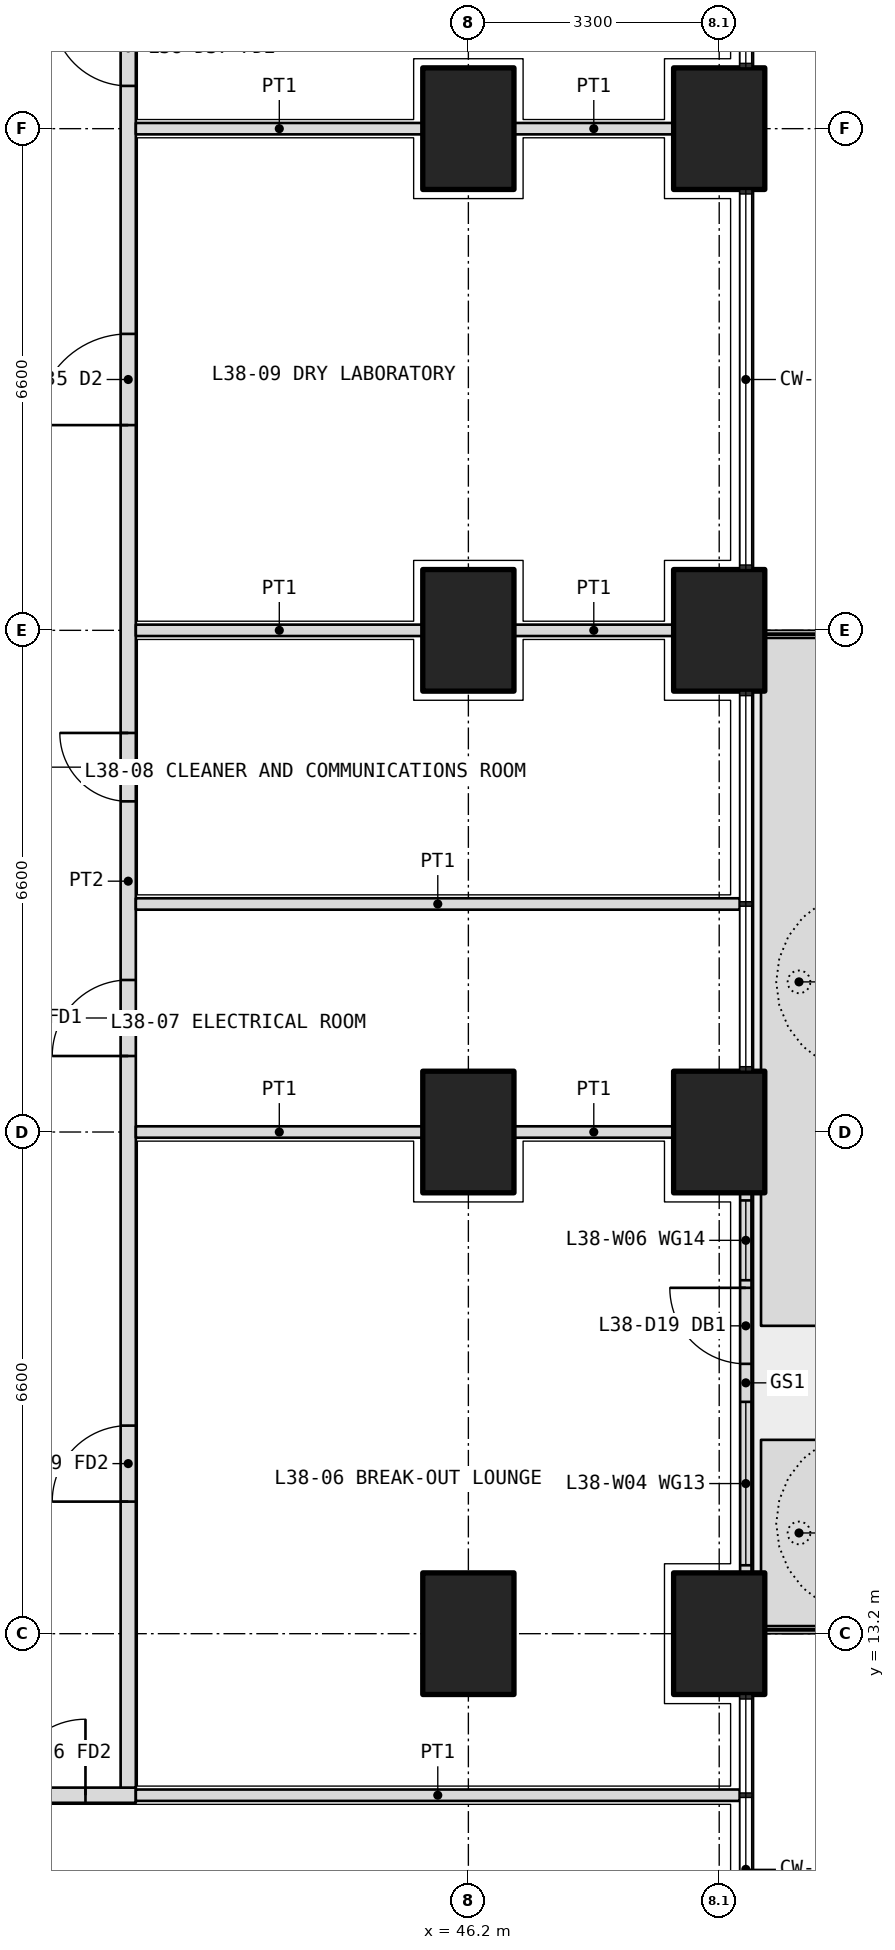
"""IFC4 building model, lengths in metres.
Left out: names, types, materials, properties, quantities, classifications, styles, units other than length and angle.
Written with IfcOpenShell. Run it as: python <this file> out.ifc"""

import sys

from ifc_helpers import new_model, si_unit, direction, frame, frame_2d, origin, origin_2d, place, context, subcontext, project, spatial, polyline, rectangle, outline, extrude, element, fill, save


model = new_model("IFC4")
c1 = context("Model", 3, precision=1e-05, world=origin(), true_north=direction((0.0, 1.0)))
c2 = subcontext(c1, "Body", "Model", "MODEL_VIEW")
j1 = project(units=[si_unit("LENGTHUNIT", "METRE"), si_unit("PLANEANGLEUNIT", "RADIAN")], contexts=[c1])
p1 = place(None, origin())
s1 = spatial("IfcSite", under=j1, at=p1, CompositionType="ELEMENT")
p2 = place(p1, origin())
s2 = spatial("IfcBuilding", under=s1, at=p2, CompositionType="ELEMENT")
p3 = place(p2, frame((0.0, 0.0, 168.3)))
s3 = spatial("IfcBuildingStorey", under=s2, at=p3, CompositionType="ELEMENT", Elevation=168.3)
for number, where, z_axis, x_axis in (
    (1, (49.5, 13.2, 0.0), (0.0, 0.0, 1.0), (0.0, 1.0, 0.0)),
    (2, (49.5, 19.8, 0.0), (0.0, 0.0, 1.0), (0.0, 1.0, 0.0)),
    (3, (49.5, 26.4, 0.0), (0.0, 0.0, 1.0), (0.0, 1.0, 0.0)),
    (4, (49.5, 33.0, 0.0), (0.0, 0.0, 1.0), (0.0, 1.0, 0.0)),
    (5, (46.2, 13.2, 0.0), (0.0, 0.0, 1.0), (0.0, 1.0, 0.0)),
    (6, (46.2, 19.8, 0.0), (0.0, 0.0, 1.0), (0.0, 1.0, 0.0)),
    (7, (46.2, 26.4, 0.0), (0.0, 0.0, 1.0), (0.0, 1.0, 0.0)),
    (8, (46.2, 33.0, 0.0), (0.0, 0.0, 1.0), (0.0, 1.0, 0.0)),
):
    element("IfcColumn", number, at=place(p3, frame(where, z_axis=z_axis, x_axis=x_axis)), inside=s3, PredefinedType="COLUMN", context=c2, shape_type="SweptSolid", body=[
        extrude(rectangle(XDim=1.6, YDim=1.2, at=origin_2d()), origin(), (0.0, 0.0, 1.0), 4.2),
    ])
p4 = place(p3, origin())
e9 = element("IfcWall", 9, at=p4, inside=s3, PredefinedType="USERDEFINED", context=c2, shape_type="SweptSolid", body=[
    extrude(outline(polyline([(50.05, 13.3), (51.05, 13.3), (51.05, 15.75), (50.05, 15.75), (50.05, 13.3)]), holes=[polyline([(50.2, 13.45), (50.9, 13.45), (50.9, 15.6), (50.2, 15.6), (50.2, 13.45)])]), origin(), (0.0, 0.0, 1.0), 1.05),
])
p5 = place(p3, origin())
e10 = element("IfcWall", 10, at=p5, inside=s3, PredefinedType="USERDEFINED", context=c2, shape_type="SweptSolid", body=[
    extrude(outline(polyline([(50.05, 17.25), (51.05, 17.25), (51.05, 26.3), (50.05, 26.3), (50.05, 17.25)]), holes=[polyline([(50.2, 17.4), (50.9, 17.4), (50.9, 26.15), (50.2, 26.15), (50.2, 17.4)])]), origin(), (0.0, 0.0, 1.0), 1.05),
])
p6 = place(p3, frame((49.85, 14.0, 0.0), z_axis=(0.0, 0.0, 1.0), x_axis=(0.0, 1.0, 0.0)))
e11 = element("IfcWall", 11, at=p6, inside=s3, PredefinedType="SOLIDWALL", context=c2, shape_type="SweptSolid", body=[
    extrude(rectangle(XDim=5.0, YDim=0.15, at=frame_2d((2.5, 0.0))), origin(), (0.0, 0.0, 1.0), 2.7),
])
p7 = place(p6, frame((2.75, 0.0, 0.0)))
e12 = element("IfcOpeningElement", 12, at=p7, cuts=e11, PredefinedType="OPENING", context=c2, shape_type="SweptSolid", body=[
    extrude(rectangle(XDim=1.0, YDim=2.4, at=frame_2d((0.5, 1.2))), frame((0.0, 0.085, 0.0), z_axis=(0.0, -1.0, 0.0), x_axis=(1.0, 0.0, 0.0)), (0.0, 0.0, 1.0), 0.17),
])
p8 = place(p6, frame((0.1, 0.0, 0.1)))
e13 = element("IfcOpeningElement", 13, at=p8, cuts=e11, PredefinedType="OPENING", context=c2, shape_type="SweptSolid", body=[
    extrude(rectangle(XDim=2.15, YDim=2.3, at=frame_2d((1.075, 1.15))), frame((0.0, 0.085, 0.0), z_axis=(0.0, -1.0, 0.0), x_axis=(1.0, 0.0, 0.0)), (0.0, 0.0, 1.0), 0.17),
])
p9 = place(p6, frame((3.85, 0.0, 0.1)))
e14 = element("IfcOpeningElement", 14, at=p9, cuts=e11, PredefinedType="OPENING", context=c2, shape_type="SweptSolid", body=[
    extrude(rectangle(XDim=1.05, YDim=2.3, at=frame_2d((0.525, 1.15))), frame((0.0, 0.085, 0.0), z_axis=(0.0, -1.0, 0.0), x_axis=(1.0, 0.0, 0.0)), (0.0, 0.0, 1.0), 0.17),
])
p10 = place(p3, frame((10.975, 11.075, 0.0), z_axis=(0.0, 0.0, 1.0), x_axis=(1.0, 0.0, 0.0)))
e15 = element("IfcWall", 15, at=p10, inside=s3, PredefinedType="PARTITIONING", context=c2, shape_type="SweptSolid", body=[
    extrude(rectangle(XDim=30.85, YDim=0.2, at=frame_2d((15.425, 0.0))), origin(), (0.0, 0.0, 1.0), 2.85),
])
p11 = place(p10, frame((7.262, 0.0, 0.0)))
e16 = element("IfcOpeningElement", 16, at=p11, cuts=e15, PredefinedType="OPENING", context=c2, shape_type="SweptSolid", body=[
    extrude(rectangle(XDim=1.0, YDim=2.1, at=frame_2d((0.5, 1.05))), frame((0.0, 0.11, 0.0), z_axis=(0.0, -1.0, 0.0), x_axis=(1.0, 0.0, 0.0)), (0.0, 0.0, 1.0), 0.22),
])
p12 = place(p10, frame((16.475, 0.0, 0.0)))
e17 = element("IfcOpeningElement", 17, at=p12, cuts=e15, PredefinedType="OPENING", context=c2, shape_type="SweptSolid", body=[
    extrude(rectangle(XDim=1.2, YDim=2.1, at=frame_2d((0.6, 1.05))), frame((0.0, 0.11, 0.0), z_axis=(0.0, -1.0, 0.0), x_axis=(1.0, 0.0, 0.0)), (0.0, 0.0, 1.0), 0.22),
])
p13 = place(p10, frame((21.525, 0.0, 0.0)))
e18 = element("IfcOpeningElement", 18, at=p13, cuts=e15, PredefinedType="OPENING", context=c2, shape_type="SweptSolid", body=[
    extrude(rectangle(XDim=1.0, YDim=2.1, at=frame_2d((0.5, 1.05))), frame((0.0, 0.11, 0.0), z_axis=(0.0, -1.0, 0.0), x_axis=(1.0, 0.0, 0.0)), (0.0, 0.0, 1.0), 0.22),
])
p14 = place(p10, frame((26.375, 0.0, 0.0)))
e19 = element("IfcOpeningElement", 19, at=p14, cuts=e15, PredefinedType="OPENING", context=c2, shape_type="SweptSolid", body=[
    extrude(rectangle(XDim=1.2, YDim=2.1, at=frame_2d((0.6, 1.05))), frame((0.0, 0.11, 0.0), z_axis=(0.0, -1.0, 0.0), x_axis=(1.0, 0.0, 0.0)), (0.0, 0.0, 1.0), 0.22),
])
p15 = place(p10, frame((29.188, 0.0, 0.0)))
e20 = element("IfcOpeningElement", 20, at=p15, cuts=e15, PredefinedType="OPENING", context=c2, shape_type="SweptSolid", body=[
    extrude(rectangle(XDim=1.0, YDim=2.1, at=frame_2d((0.5, 1.05))), frame((0.0, 0.11, 0.0), z_axis=(0.0, -1.0, 0.0), x_axis=(1.0, 0.0, 0.0)), (0.0, 0.0, 1.0), 0.22),
])
p16 = place(p3, frame((41.725, 11.175, 0.0), z_axis=(0.0, 0.0, 1.0), x_axis=(0.0, 1.0, 0.0)))
e21 = element("IfcWall", 21, at=p16, inside=s3, PredefinedType="PARTITIONING", context=c2, shape_type="SweptSolid", body=[
    extrude(rectangle(XDim=23.85, YDim=0.2, at=frame_2d((11.925, 0.0))), origin(), (0.0, 0.0, 1.0), 2.85),
])
p17 = place(p16, frame((3.762, 0.0, 0.0)))
e22 = element("IfcOpeningElement", 22, at=p17, cuts=e21, PredefinedType="OPENING", context=c2, shape_type="SweptSolid", body=[
    extrude(rectangle(XDim=1.0, YDim=2.1, at=frame_2d((0.5, 1.05))), frame((0.0, 0.11, 0.0), z_axis=(0.0, -1.0, 0.0), x_axis=(1.0, 0.0, 0.0)), (0.0, 0.0, 1.0), 0.22),
])
p18 = place(p16, frame((9.625, 0.0, 0.0)))
e23 = element("IfcOpeningElement", 23, at=p18, cuts=e21, PredefinedType="OPENING", context=c2, shape_type="SweptSolid", body=[
    extrude(rectangle(XDim=1.0, YDim=2.1, at=frame_2d((0.5, 1.05))), frame((0.0, 0.11, 0.0), z_axis=(0.0, -1.0, 0.0), x_axis=(1.0, 0.0, 0.0)), (0.0, 0.0, 1.0), 0.22),
])
p19 = place(p16, frame((12.975, 0.0, 0.0)))
e24 = element("IfcOpeningElement", 24, at=p19, cuts=e21, PredefinedType="OPENING", context=c2, shape_type="SweptSolid", body=[
    extrude(rectangle(XDim=0.9, YDim=2.1, at=frame_2d((0.45, 1.05))), frame((0.0, 0.11, 0.0), z_axis=(0.0, -1.0, 0.0), x_axis=(1.0, 0.0, 0.0)), (0.0, 0.0, 1.0), 0.22),
])
p20 = place(p16, frame((17.925, 0.0, 0.0)))
e25 = element("IfcOpeningElement", 25, at=p20, cuts=e21, PredefinedType="OPENING", context=c2, shape_type="SweptSolid", body=[
    extrude(rectangle(XDim=1.2, YDim=2.1, at=frame_2d((0.6, 1.05))), frame((0.0, 0.11, 0.0), z_axis=(0.0, -1.0, 0.0), x_axis=(1.0, 0.0, 0.0)), (0.0, 0.0, 1.0), 0.22),
])
p21 = place(p16, frame((22.387, 0.0, 0.0)))
e26 = element("IfcOpeningElement", 26, at=p21, cuts=e21, PredefinedType="OPENING", context=c2, shape_type="SweptSolid", body=[
    extrude(rectangle(XDim=1.0, YDim=2.1, at=frame_2d((0.5, 1.05))), frame((0.0, 0.11, 0.0), z_axis=(0.0, -1.0, 0.0), x_axis=(1.0, 0.0, 0.0)), (0.0, 0.0, 1.0), 0.22),
])
for number, where, z_axis, x_axis in (
    (27, (49.77, 11.075, 0.0), (0.0, 0.0, 1.0), (-1.0, 0.0, 0.0)),
    (28, (49.77, 22.8, 0.0), (0.0, 0.0, 1.0), (-1.0, 0.0, 0.0)),
):
    element("IfcWall", number, at=place(p3, frame(where, z_axis=z_axis, x_axis=x_axis)), inside=s3, PredefinedType="PARTITIONING", context=c2, shape_type="SweptSolid", body=[
        extrude(rectangle(XDim=7.945, YDim=0.15, at=frame_2d((3.973, 0.0))), origin(), (0.0, 0.0, 1.0), 2.7),
    ])
p22 = place(p3, frame((48.9, 26.4, 0.0), z_axis=(0.0, 0.0, 1.0), x_axis=(-1.0, 0.0, 0.0)))
e29 = element("IfcWall", 29, at=p22, inside=s3, PredefinedType="PARTITIONING", context=c2, shape_type="SweptSolid", body=[
    extrude(rectangle(XDim=2.1, YDim=0.15, at=frame_2d((1.05, 0.0))), origin(), (0.0, 0.0, 1.0), 2.85),
])
p23 = place(p3, frame((45.6, 26.4, 0.0), z_axis=(0.0, 0.0, 1.0), x_axis=(-1.0, 0.0, 0.0)))
e30 = element("IfcWall", 30, at=p23, inside=s3, PredefinedType="PARTITIONING", context=c2, shape_type="SweptSolid", body=[
    extrude(rectangle(XDim=3.775, YDim=0.15, at=frame_2d((1.888, 0.0))), origin(), (0.0, 0.0, 1.0), 2.85),
])
p24 = place(p3, frame((48.9, 19.8, 0.0), z_axis=(0.0, 0.0, 1.0), x_axis=(-1.0, 0.0, 0.0)))
e31 = element("IfcWall", 31, at=p24, inside=s3, PredefinedType="PARTITIONING", context=c2, shape_type="SweptSolid", body=[
    extrude(rectangle(XDim=2.1, YDim=0.15, at=frame_2d((1.05, 0.0))), origin(), (0.0, 0.0, 1.0), 2.85),
])
p25 = place(p3, frame((45.6, 19.8, 0.0), z_axis=(0.0, 0.0, 1.0), x_axis=(-1.0, 0.0, 0.0)))
e32 = element("IfcWall", 32, at=p25, inside=s3, PredefinedType="PARTITIONING", context=c2, shape_type="SweptSolid", body=[
    extrude(rectangle(XDim=3.775, YDim=0.15, at=frame_2d((1.888, 0.0))), origin(), (0.0, 0.0, 1.0), 2.85),
])
p26 = place(p3, frame((48.9, 33.0, 0.0), z_axis=(0.0, 0.0, 1.0), x_axis=(-1.0, 0.0, 0.0)))
e33 = element("IfcWall", 33, at=p26, inside=s3, PredefinedType="PARTITIONING", context=c2, shape_type="SweptSolid", body=[
    extrude(rectangle(XDim=2.1, YDim=0.15, at=frame_2d((1.05, 0.0))), origin(), (0.0, 0.0, 1.0), 2.85),
])
p27 = place(p3, frame((45.6, 33.0, 0.0), z_axis=(0.0, 0.0, 1.0), x_axis=(-1.0, 0.0, 0.0)))
e34 = element("IfcWall", 34, at=p27, inside=s3, PredefinedType="PARTITIONING", context=c2, shape_type="SweptSolid", body=[
    extrude(rectangle(XDim=3.775, YDim=0.15, at=frame_2d((1.888, 0.0))), origin(), (0.0, 0.0, 1.0), 2.85),
])
p28 = place(p7, origin())
e35 = element("IfcDoor", 35, at=p28, inside=s3, OperationType="SINGLE_SWING_RIGHT", PredefinedType="DOOR", context=c2, shape_type="SweptSolid", body=[
    extrude(rectangle(XDim=1.0, YDim=2.4, at=frame_2d((0.5, 1.2))), frame((0.0, 0.025, 0.0), z_axis=(0.0, -1.0, 0.0), x_axis=(1.0, 0.0, 0.0)), (0.0, 0.0, 1.0), 0.05),
])
fill(e12, e35)
p29 = place(p8, origin())
e36 = element("IfcWindow", 36, at=p29, inside=s3, PartitioningType="SINGLE_PANEL", PredefinedType="WINDOW", context=c2, shape_type="SweptSolid", body=[
    extrude(rectangle(XDim=2.15, YDim=2.3, at=frame_2d((1.075, 1.15))), frame((0.0, 0.03, 0.0), z_axis=(0.0, -1.0, 0.0), x_axis=(1.0, 0.0, 0.0)), (0.0, 0.0, 1.0), 0.06),
])
fill(e13, e36)
p30 = place(p9, origin())
e37 = element("IfcWindow", 37, at=p30, inside=s3, PartitioningType="SINGLE_PANEL", PredefinedType="WINDOW", context=c2, shape_type="SweptSolid", body=[
    extrude(rectangle(XDim=1.05, YDim=2.3, at=frame_2d((0.525, 1.15))), frame((0.0, 0.03, 0.0), z_axis=(0.0, -1.0, 0.0), x_axis=(1.0, 0.0, 0.0)), (0.0, 0.0, 1.0), 0.06),
])
fill(e14, e37)
p31 = place(p15, origin())
e38 = element("IfcDoor", 38, at=p31, inside=s3, OperationType="SINGLE_SWING_RIGHT", PredefinedType="DOOR", context=c2, shape_type="SweptSolid", body=[
    extrude(rectangle(XDim=1.0, YDim=2.1, at=frame_2d((0.5, 1.05))), frame((0.0, 0.025, 0.0), z_axis=(0.0, -1.0, 0.0), x_axis=(1.0, 0.0, 0.0)), (0.0, 0.0, 1.0), 0.05),
])
fill(e20, e38)
p32 = place(p17, origin())
e39 = element("IfcDoor", 39, at=p32, inside=s3, OperationType="SINGLE_SWING_LEFT", PredefinedType="DOOR", context=c2, shape_type="SweptSolid", body=[
    extrude(rectangle(XDim=1.0, YDim=2.1, at=frame_2d((0.5, 1.05))), frame((0.0, 0.025, 0.0), z_axis=(0.0, -1.0, 0.0), x_axis=(1.0, 0.0, 0.0)), (0.0, 0.0, 1.0), 0.05),
])
fill(e22, e39)
p33 = place(p18, origin())
e40 = element("IfcDoor", 40, at=p33, inside=s3, OperationType="SINGLE_SWING_LEFT", PredefinedType="DOOR", context=c2, shape_type="SweptSolid", body=[
    extrude(rectangle(XDim=1.0, YDim=2.1, at=frame_2d((0.5, 1.05))), frame((0.0, 0.025, 0.0), z_axis=(0.0, -1.0, 0.0), x_axis=(1.0, 0.0, 0.0)), (0.0, 0.0, 1.0), 0.05),
])
fill(e23, e40)
p34 = place(p19, origin())
e41 = element("IfcDoor", 41, at=p34, inside=s3, OperationType="SINGLE_SWING_RIGHT", PredefinedType="DOOR", context=c2, shape_type="SweptSolid", body=[
    extrude(rectangle(XDim=0.9, YDim=2.1, at=frame_2d((0.45, 1.05))), frame((0.0, 0.025, 0.0), z_axis=(0.0, -1.0, 0.0), x_axis=(1.0, 0.0, 0.0)), (0.0, 0.0, 1.0), 0.05),
])
fill(e24, e41)
p35 = place(p20, origin())
e42 = element("IfcDoor", 42, at=p35, inside=s3, OperationType="DOUBLE_DOOR_SINGLE_SWING", PredefinedType="DOOR", context=c2, shape_type="SweptSolid", body=[
    extrude(rectangle(XDim=1.2, YDim=2.1, at=frame_2d((0.6, 1.05))), frame((0.0, 0.025, 0.0), z_axis=(0.0, -1.0, 0.0), x_axis=(1.0, 0.0, 0.0)), (0.0, 0.0, 1.0), 0.05),
])
fill(e25, e42)
p36 = place(p21, origin())
e43 = element("IfcDoor", 43, at=p36, inside=s3, OperationType="SINGLE_SWING_RIGHT", PredefinedType="DOOR", context=c2, shape_type="SweptSolid", body=[
    extrude(rectangle(XDim=1.0, YDim=2.1, at=frame_2d((0.5, 1.05))), frame((0.0, 0.025, 0.0), z_axis=(0.0, -1.0, 0.0), x_axis=(1.0, 0.0, 0.0)), (0.0, 0.0, 1.0), 0.05),
])
fill(e26, e43)
save(model, sys.argv[1])
